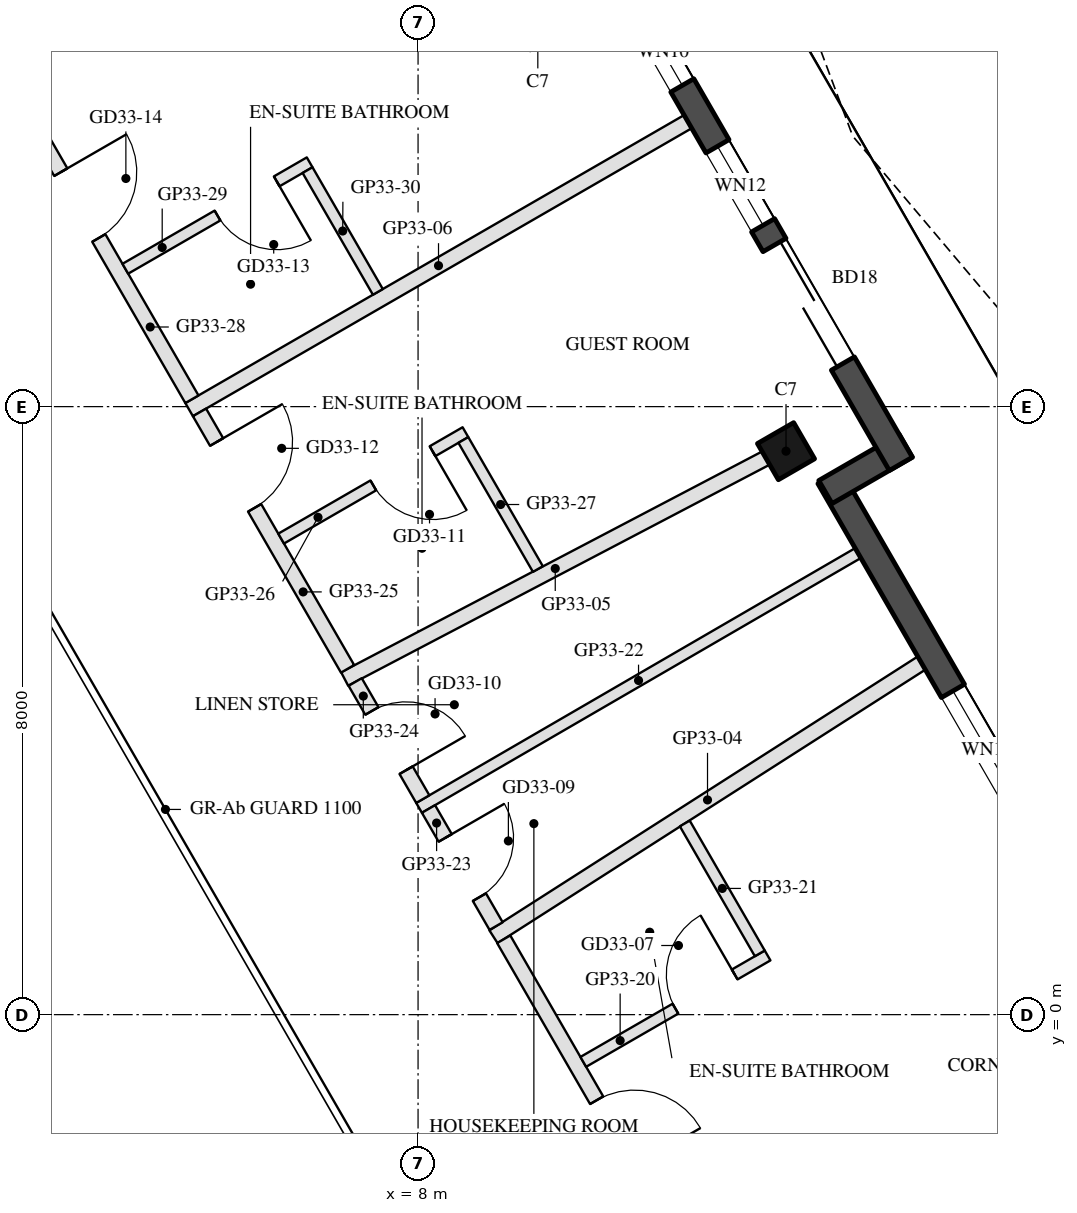
"""IFC4 building model, lengths in metres.
Left out: names, types, materials, properties, quantities, classifications, styles, units other than length and angle.
Written with IfcOpenShell. Run it as: python <this file> out.ifc"""

import sys

from ifc_helpers import new_model, si_unit, direction, frame, frame_2d, origin, origin_2d, place, context, subcontext, project, spatial, rectangle, hollow_rectangle, extrude, boolean, halfspace, element, fill, save


model = new_model("IFC4")
c1 = context("Model", 3, precision=1e-05, world=origin(), true_north=direction((0.0, 1.0)))
c2 = subcontext(c1, "Body", "Model", "MODEL_VIEW")
j1 = project(units=[si_unit("LENGTHUNIT", "METRE"), si_unit("PLANEANGLEUNIT", "RADIAN")], contexts=[c1])
p1 = place(None, origin())
s1 = spatial("IfcSite", under=j1, at=p1, CompositionType="ELEMENT")
p2 = place(p1, origin())
s2 = spatial("IfcBuilding", under=s1, at=p2, CompositionType="ELEMENT")
p3 = place(p2, frame((0.0, 0.0, 313.3)))
s3 = spatial("IfcBuildingStorey", under=s2, at=p3, CompositionType="ELEMENT", Elevation=313.3)
p4 = place(p3, frame((12.841, 7.414, 0.0), z_axis=(0.0, 0.0, 1.0), x_axis=(-0.5, 0.866025403784, 0.0)))
e1 = element("IfcColumn", 1, at=p4, inside=s3, PredefinedType="COLUMN", context=c2, shape_type="SweptSolid", body=[
    boolean("DIFFERENCE", extrude(hollow_rectangle(XDim=0.55, YDim=0.55, WallThickness=0.025, at=origin_2d()), origin(), (0.0, 0.0, 1.0), 3.7), halfspace(frame((0.0, 0.0, 0.031), z_axis=(0.0, 0.0, 1.0), x_axis=(1.0, 0.0, 0.0)), True)),
])
p5 = place(p3, frame((16.098, 2.423, 0.0), z_axis=(0.0, 0.0, 1.0), x_axis=(-0.499996591357, 0.866027371756, 0.0)))
e2 = element("IfcWall", 2, at=p5, inside=s3, PredefinedType="SOLIDWALL", context=c2, shape_type="SweptSolid", body=[
    extrude(rectangle(XDim=5.371, YDim=0.35, at=frame_2d((2.685, 0.0))), origin(), (0.0, 0.0, 1.0), 3.55),
])
p6 = place(p5, frame((0.32, 0.0, 0.3)))
e3 = element("IfcOpeningElement", 3, at=p6, cuts=e2, PredefinedType="OPENING", context=c2, shape_type="SweptSolid", body=[
    extrude(rectangle(XDim=1.8, YDim=2.65, at=frame_2d((0.9, 1.325))), frame((0.0, 0.185, 0.0), z_axis=(0.0, -1.0, 0.0), x_axis=(1.0, 0.0, 0.0)), (0.0, 0.0, 1.0), 0.37),
])
p7 = place(p3, frame((13.359, 6.876, 0.0), z_axis=(0.0, 0.0, 1.0), x_axis=(0.866092288191, 0.499884134912, 0.0)))
e4 = element("IfcWall", 4, at=p7, inside=s3, PredefinedType="SOLIDWALL", context=c2, shape_type="SweptSolid", body=[
    extrude(rectangle(XDim=1.22, YDim=0.35, at=frame_2d((0.61, 0.0))), origin(), (0.0, 0.0, 1.0), 3.55),
])
p8 = place(p3, frame((14.352, 7.247, 0.0), z_axis=(0.0, 0.0, 1.0), x_axis=(-0.499993893925, 0.8660289291, 0.0)))
e5 = element("IfcWall", 5, at=p8, inside=s3, PredefinedType="SOLIDWALL", context=c2, shape_type="SweptSolid", body=[
    extrude(rectangle(XDim=8.331, YDim=0.35, at=frame_2d((4.165, 0.0))), origin(), (0.0, 0.0, 1.0), 3.55),
])
p9 = place(p8, frame((1.525, 0.0, 0.0)))
e6 = element("IfcOpeningElement", 6, at=p9, cuts=e5, PredefinedType="OPENING", context=c2, shape_type="SweptSolid", body=[
    extrude(rectangle(XDim=1.8, YDim=2.4, at=frame_2d((0.9, 1.2))), frame((0.0, 0.185, 0.0), z_axis=(0.0, -1.0, 0.0), x_axis=(1.0, 0.0, 0.0)), (0.0, 0.0, 1.0), 0.37),
])
p10 = place(p8, frame((3.625, 0.0, 0.3)))
e7 = element("IfcOpeningElement", 7, at=p10, cuts=e5, PredefinedType="OPENING", context=c2, shape_type="SweptSolid", body=[
    extrude(rectangle(XDim=1.2, YDim=2.65, at=frame_2d((0.6, 1.325))), frame((0.0, 0.185, 0.0), z_axis=(0.0, -1.0, 0.0), x_axis=(1.0, 0.0, 0.0)), (0.0, 0.0, 1.0), 0.37),
])
p11 = place(p8, frame((5.75, 0.0, 0.3)))
e8 = element("IfcOpeningElement", 8, at=p11, cuts=e5, PredefinedType="OPENING", context=c2, shape_type="SweptSolid", body=[
    extrude(rectangle(XDim=1.0, YDim=2.65, at=frame_2d((0.5, 1.325))), frame((0.0, 0.185, 0.0), z_axis=(0.0, -1.0, 0.0), x_axis=(1.0, 0.0, 0.0)), (0.0, 0.0, 1.0), 0.37),
])
p12 = place(p3, frame((14.624, 4.625, 0.0), z_axis=(0.0, 0.0, 1.0), x_axis=(-0.842484919653, -0.53871992738, 0.0)))
e9 = element("IfcWall", 9, at=p12, inside=s3, PredefinedType="PARTITIONING", context=c2, shape_type="SweptSolid", body=[
    extrude(rectangle(XDim=6.685, YDim=0.2, at=frame_2d((3.342, 0.0))), origin(), (0.0, 0.0, 1.0), 3.1),
])
p13 = place(p3, frame((12.576, 7.323, 0.0), z_axis=(0.0, 0.0, 1.0), x_axis=(-0.885630617544, -0.464390363023, 0.0)))
e10 = element("IfcWall", 10, at=p13, inside=s3, PredefinedType="PARTITIONING", context=c2, shape_type="SweptSolid", body=[
    extrude(rectangle(XDim=6.258, YDim=0.2, at=frame_2d((3.129, 0.0))), origin(), (0.0, 0.0, 1.0), 3.1),
])
p14 = place(p3, frame((11.55, 11.749, 0.0), z_axis=(0.0, 0.0, 1.0), x_axis=(-0.866019793702, -0.500009716822, 0.0)))
e11 = element("IfcWall", 11, at=p14, inside=s3, PredefinedType="PARTITIONING", context=c2, shape_type="SweptSolid", body=[
    extrude(rectangle(XDim=7.577, YDim=0.2, at=frame_2d((3.789, 0.0))), origin(), (0.0, 0.0, 1.0), 3.16),
])
p15 = place(p3, frame((9.127, 0.992, 0.0), z_axis=(0.0, 0.0, 1.0), x_axis=(0.500012817413, -0.866018003521, 0.0)))
e12 = element("IfcWall", 12, at=p15, inside=s3, PredefinedType="PARTITIONING", context=c2, shape_type="SweptSolid", body=[
    extrude(rectangle(XDim=6.283, YDim=0.2, at=frame_2d((3.142, 0.0))), origin(), (0.0, 0.0, 1.0), 3.1),
])
p16 = place(p15, frame((2.446, 0.0, 0.0)))
e13 = element("IfcOpeningElement", 13, at=p16, cuts=e12, PredefinedType="OPENING", context=c2, shape_type="SweptSolid", body=[
    extrude(rectangle(XDim=1.0, YDim=2.1, at=frame_2d((0.5, 1.05))), frame((0.0, 0.11, 0.0), z_axis=(0.0, -1.0, 0.0), x_axis=(1.0, 0.0, 0.0)), (0.0, 0.0, 1.0), 0.22),
])
p17 = place(p3, frame((10.174, -0.622, 0.0), z_axis=(0.0, 0.0, 1.0), x_axis=(0.865996816683, 0.500049511043, 0.0)))
e14 = element("IfcWall", 14, at=p17, inside=s3, PredefinedType="PARTITIONING", context=c2, shape_type="SweptSolid", body=[
    extrude(rectangle(XDim=2.8, YDim=0.15, at=frame_2d((1.4, 0.0))), origin(), (0.0, 0.0, 1.0), 3.55),
])
p18 = place(p17, frame((1.4, 0.0, 0.0)))
e15 = element("IfcOpeningElement", 15, at=p18, cuts=e14, PredefinedType="OPENING", context=c2, shape_type="SweptSolid", body=[
    extrude(rectangle(XDim=0.9, YDim=2.1, at=frame_2d((0.45, 1.05))), frame((0.0, 0.085, 0.0), z_axis=(0.0, -1.0, 0.0), x_axis=(1.0, 0.0, 0.0)), (0.0, 0.0, 1.0), 0.17),
])
p19 = place(p3, frame((12.496, 0.806, 0.0), z_axis=(0.0, 0.0, 1.0), x_axis=(-0.499904503454, 0.866080531721, 0.0)))
e16 = element("IfcWall", 16, at=p19, inside=s3, PredefinedType="PARTITIONING", context=c2, shape_type="SweptSolid", body=[
    extrude(rectangle(XDim=1.974, YDim=0.15, at=frame_2d((0.987, 0.0))), origin(), (0.0, 0.0, 1.0), 3.55),
])
p20 = place(p3, frame((13.788, 6.073, 0.0), z_axis=(0.0, 0.0, 1.0), x_axis=(-0.864855005342, -0.502021732334, 0.0)))
e17 = element("IfcWall", 17, at=p20, inside=s3, PredefinedType="PARTITIONING", context=c2, shape_type="SweptSolid", body=[
    extrude(rectangle(XDim=6.677, YDim=0.15, at=frame_2d((3.339, 0.0))), origin(), (0.0, 0.0, 1.0), 3.16),
])
p21 = place(p3, frame((8.137, 2.706, 0.0), z_axis=(0.0, 0.0, 1.0), x_axis=(0.500035243338, -0.866005055078, 0.0)))
e18 = element("IfcWall", 18, at=p21, inside=s3, PredefinedType="PARTITIONING", context=c2, shape_type="SweptSolid", body=[
    extrude(rectangle(XDim=1.779, YDim=0.2, at=frame_2d((0.89, 0.0))), origin(), (0.0, 0.0, 1.0), 3.1),
])
p22 = place(p21, frame((0.44, 0.0, 0.0)))
e19 = element("IfcOpeningElement", 19, at=p22, cuts=e18, PredefinedType="OPENING", context=c2, shape_type="SweptSolid", body=[
    extrude(rectangle(XDim=0.9, YDim=2.1, at=frame_2d((0.45, 1.05))), frame((0.0, 0.11, 0.0), z_axis=(0.0, -1.0, 0.0), x_axis=(1.0, 0.0, 0.0)), (0.0, 0.0, 1.0), 0.22),
])
p23 = place(p3, frame((7.173, 4.377, 0.0), z_axis=(0.0, 0.0, 1.0), x_axis=(0.499975827765, -0.866039359181, 0.0)))
e20 = element("IfcWall", 20, at=p23, inside=s3, PredefinedType="PARTITIONING", context=c2, shape_type="SweptSolid", body=[
    extrude(rectangle(XDim=1.779, YDim=0.2, at=frame_2d((0.89, 0.0))), origin(), (0.0, 0.0, 1.0), 3.1),
])
p24 = place(p23, frame((0.44, 0.0, 0.0)))
e21 = element("IfcOpeningElement", 21, at=p24, cuts=e20, PredefinedType="OPENING", context=c2, shape_type="SweptSolid", body=[
    extrude(rectangle(XDim=0.9, YDim=2.1, at=frame_2d((0.45, 1.05))), frame((0.0, 0.11, 0.0), z_axis=(0.0, -1.0, 0.0), x_axis=(1.0, 0.0, 0.0)), (0.0, 0.0, 1.0), 0.22),
])
p25 = place(p3, frame((5.125, 7.924, 0.0), z_axis=(0.0, 0.0, 1.0), x_axis=(0.500028041952, -0.866009213151, 0.0)))
e22 = element("IfcWall", 22, at=p25, inside=s3, PredefinedType="PARTITIONING", context=c2, shape_type="SweptSolid", body=[
    extrude(rectangle(XDim=3.896, YDim=0.2, at=frame_2d((1.948, 0.0))), origin(), (0.0, 0.0, 1.0), 3.1),
])
p26 = place(p25, frame((0.45, 0.0, 0.0)))
e23 = element("IfcOpeningElement", 23, at=p26, cuts=e22, PredefinedType="OPENING", context=c2, shape_type="SweptSolid", body=[
    extrude(rectangle(XDim=1.0, YDim=2.1, at=frame_2d((0.5, 1.05))), frame((0.0, 0.11, 0.0), z_axis=(0.0, -1.0, 0.0), x_axis=(1.0, 0.0, 0.0)), (0.0, 0.0, 1.0), 0.22),
])
p27 = place(p3, frame((8.624, 7.664, 0.0), z_axis=(0.0, 0.0, 1.0), x_axis=(-0.866034573852, -0.49998411664, 0.0)))
e24 = element("IfcWall", 24, at=p27, inside=s3, PredefinedType="PARTITIONING", context=c2, shape_type="SweptSolid", body=[
    extrude(rectangle(XDim=2.8, YDim=0.15, at=frame_2d((1.4, 0.0))), origin(), (0.0, 0.0, 1.0), 3.55),
])
p28 = place(p27, frame((0.5, 0.0, 0.0)))
e25 = element("IfcOpeningElement", 25, at=p28, cuts=e24, PredefinedType="OPENING", context=c2, shape_type="SweptSolid", body=[
    extrude(rectangle(XDim=0.9, YDim=2.1, at=frame_2d((0.45, 1.05))), frame((0.0, 0.085, 0.0), z_axis=(0.0, -1.0, 0.0), x_axis=(1.0, 0.0, 0.0)), (0.0, 0.0, 1.0), 0.17),
])
p29 = place(p3, frame((9.576, 5.863, 0.0), z_axis=(0.0, 0.0, 1.0), x_axis=(-0.499956000529, 0.8660508054, 0.0)))
e26 = element("IfcWall", 26, at=p29, inside=s3, PredefinedType="PARTITIONING", context=c2, shape_type="SweptSolid", body=[
    extrude(rectangle(XDim=1.961, YDim=0.15, at=frame_2d((0.98, 0.0))), origin(), (0.0, 0.0, 1.0), 3.55),
])
p30 = place(p3, frame((2.281, 12.85, 0.0), z_axis=(0.0, 0.0, 1.0), x_axis=(0.500004836318, -0.866022611517, 0.0)))
e27 = element("IfcWall", 27, at=p30, inside=s3, PredefinedType="PARTITIONING", context=c2, shape_type="SweptSolid", body=[
    extrude(rectangle(XDim=5.488, YDim=0.2, at=frame_2d((2.744, 0.0))), origin(), (0.0, 0.0, 1.0), 3.1),
])
p31 = place(p30, frame((2.038, 0.0, 0.0)))
e28 = element("IfcOpeningElement", 28, at=p31, cuts=e27, PredefinedType="OPENING", context=c2, shape_type="SweptSolid", body=[
    extrude(rectangle(XDim=1.0, YDim=2.1, at=frame_2d((0.5, 1.05))), frame((0.0, 0.11, 0.0), z_axis=(0.0, -1.0, 0.0), x_axis=(1.0, 0.0, 0.0)), (0.0, 0.0, 1.0), 0.22),
])
p32 = place(p3, frame((6.573, 11.214, 0.0), z_axis=(0.0, 0.0, 1.0), x_axis=(-0.866034573852, -0.49998411664, 0.0)))
e29 = element("IfcWall", 29, at=p32, inside=s3, PredefinedType="PARTITIONING", context=c2, shape_type="SweptSolid", body=[
    extrude(rectangle(XDim=2.8, YDim=0.15, at=frame_2d((1.4, 0.0))), origin(), (0.0, 0.0, 1.0), 3.1),
])
p33 = place(p32, frame((0.5, 0.0, 0.0)))
e30 = element("IfcOpeningElement", 30, at=p33, cuts=e29, PredefinedType="OPENING", context=c2, shape_type="SweptSolid", body=[
    extrude(rectangle(XDim=0.9, YDim=2.1, at=frame_2d((0.45, 1.05))), frame((0.0, 0.085, 0.0), z_axis=(0.0, -1.0, 0.0), x_axis=(1.0, 0.0, 0.0)), (0.0, 0.0, 1.0), 0.17),
])
p34 = place(p3, frame((7.471, 9.51, 0.0), z_axis=(0.0, 0.0, 1.0), x_axis=(-0.499985172903, 0.866033964044, 0.0)))
e31 = element("IfcWall", 31, at=p34, inside=s3, PredefinedType="PARTITIONING", context=c2, shape_type="SweptSolid", body=[
    extrude(rectangle(XDim=1.85, YDim=0.15, at=frame_2d((0.925, 0.0))), origin(), (0.0, 0.0, 1.0), 3.55),
])
p35 = place(p6, origin())
e32 = element("IfcWindow", 32, at=p35, inside=s3, PartitioningType="SINGLE_PANEL", PredefinedType="WINDOW", context=c2, shape_type="SweptSolid", body=[
    extrude(rectangle(XDim=1.8, YDim=2.65, at=frame_2d((0.9, 1.325))), frame((0.0, 0.03, 0.0), z_axis=(0.0, -1.0, 0.0), x_axis=(1.0, 0.0, 0.0)), (0.0, 0.0, 1.0), 0.06),
])
fill(e3, e32)
p36 = place(p9, frame((1.8, 0.0, 0.0), z_axis=(0.0, 0.0, 1.0), x_axis=(-1.0, 0.0, 0.0)))
e33 = element("IfcDoor", 33, at=p36, inside=s3, OperationType="SLIDING_TO_LEFT", PredefinedType="DOOR", context=c2, shape_type="SweptSolid", body=[
    extrude(rectangle(XDim=1.8, YDim=2.4, at=frame_2d((0.9, 1.2))), frame((0.0, 0.025, 0.0), z_axis=(0.0, -1.0, 0.0), x_axis=(1.0, 0.0, 0.0)), (0.0, 0.0, 1.0), 0.05),
])
fill(e6, e33)
p37 = place(p10, origin())
e34 = element("IfcWindow", 34, at=p37, inside=s3, PartitioningType="SINGLE_PANEL", PredefinedType="WINDOW", context=c2, shape_type="SweptSolid", body=[
    extrude(rectangle(XDim=1.2, YDim=2.65, at=frame_2d((0.6, 1.325))), frame((0.0, 0.03, 0.0), z_axis=(0.0, -1.0, 0.0), x_axis=(1.0, 0.0, 0.0)), (0.0, 0.0, 1.0), 0.06),
])
fill(e7, e34)
p38 = place(p11, origin())
e35 = element("IfcWindow", 35, at=p38, inside=s3, PartitioningType="SINGLE_PANEL", PredefinedType="WINDOW", context=c2, shape_type="SweptSolid", body=[
    extrude(rectangle(XDim=1.0, YDim=2.65, at=frame_2d((0.5, 1.325))), frame((0.0, 0.03, 0.0), z_axis=(0.0, -1.0, 0.0), x_axis=(1.0, 0.0, 0.0)), (0.0, 0.0, 1.0), 0.06),
])
fill(e8, e35)
p39 = place(p18, origin())
e36 = element("IfcDoor", 36, at=p39, inside=s3, OperationType="SINGLE_SWING_RIGHT", PredefinedType="DOOR", context=c2, shape_type="SweptSolid", body=[
    extrude(rectangle(XDim=0.9, YDim=2.1, at=frame_2d((0.45, 1.05))), frame((0.0, 0.025, 0.0), z_axis=(0.0, -1.0, 0.0), x_axis=(1.0, 0.0, 0.0)), (0.0, 0.0, 1.0), 0.05),
])
fill(e15, e36)
p40 = place(p16, origin())
e37 = element("IfcDoor", 37, at=p40, inside=s3, OperationType="SINGLE_SWING_RIGHT", PredefinedType="DOOR", context=c2, shape_type="SweptSolid", body=[
    extrude(rectangle(XDim=1.0, YDim=2.1, at=frame_2d((0.5, 1.05))), frame((0.0, 0.025, 0.0), z_axis=(0.0, -1.0, 0.0), x_axis=(1.0, 0.0, 0.0)), (0.0, 0.0, 1.0), 0.05),
])
fill(e13, e37)
p41 = place(p22, origin())
e38 = element("IfcDoor", 38, at=p41, inside=s3, OperationType="SINGLE_SWING_LEFT", PredefinedType="DOOR", context=c2, shape_type="SweptSolid", body=[
    extrude(rectangle(XDim=0.9, YDim=2.1, at=frame_2d((0.45, 1.05))), frame((0.0, 0.025, 0.0), z_axis=(0.0, -1.0, 0.0), x_axis=(1.0, 0.0, 0.0)), (0.0, 0.0, 1.0), 0.05),
])
fill(e19, e38)
p42 = place(p24, origin())
e39 = element("IfcDoor", 39, at=p42, inside=s3, OperationType="SINGLE_SWING_RIGHT", PredefinedType="DOOR", context=c2, shape_type="SweptSolid", body=[
    extrude(rectangle(XDim=0.9, YDim=2.1, at=frame_2d((0.45, 1.05))), frame((0.0, 0.025, 0.0), z_axis=(0.0, -1.0, 0.0), x_axis=(1.0, 0.0, 0.0)), (0.0, 0.0, 1.0), 0.05),
])
fill(e21, e39)
p43 = place(p28, origin())
e40 = element("IfcDoor", 40, at=p43, inside=s3, OperationType="SINGLE_SWING_LEFT", PredefinedType="DOOR", context=c2, shape_type="SweptSolid", body=[
    extrude(rectangle(XDim=0.9, YDim=2.1, at=frame_2d((0.45, 1.05))), frame((0.0, 0.025, 0.0), z_axis=(0.0, -1.0, 0.0), x_axis=(1.0, 0.0, 0.0)), (0.0, 0.0, 1.0), 0.05),
])
fill(e25, e40)
p44 = place(p26, origin())
e41 = element("IfcDoor", 41, at=p44, inside=s3, OperationType="SINGLE_SWING_LEFT", PredefinedType="DOOR", context=c2, shape_type="SweptSolid", body=[
    extrude(rectangle(XDim=1.0, YDim=2.1, at=frame_2d((0.5, 1.05))), frame((0.0, 0.025, 0.0), z_axis=(0.0, -1.0, 0.0), x_axis=(1.0, 0.0, 0.0)), (0.0, 0.0, 1.0), 0.05),
])
fill(e23, e41)
p45 = place(p33, origin())
e42 = element("IfcDoor", 42, at=p45, inside=s3, OperationType="SINGLE_SWING_LEFT", PredefinedType="DOOR", context=c2, shape_type="SweptSolid", body=[
    extrude(rectangle(XDim=0.9, YDim=2.1, at=frame_2d((0.45, 1.05))), frame((0.0, 0.025, 0.0), z_axis=(0.0, -1.0, 0.0), x_axis=(1.0, 0.0, 0.0)), (0.0, 0.0, 1.0), 0.05),
])
fill(e30, e42)
p46 = place(p31, origin())
e43 = element("IfcDoor", 43, at=p46, inside=s3, OperationType="SINGLE_SWING_LEFT", PredefinedType="DOOR", context=c2, shape_type="SweptSolid", body=[
    extrude(rectangle(XDim=1.0, YDim=2.1, at=frame_2d((0.5, 1.05))), frame((0.0, 0.025, 0.0), z_axis=(0.0, -1.0, 0.0), x_axis=(1.0, 0.0, 0.0)), (0.0, 0.0, 1.0), 0.05),
])
fill(e28, e43)
save(model, sys.argv[1])
